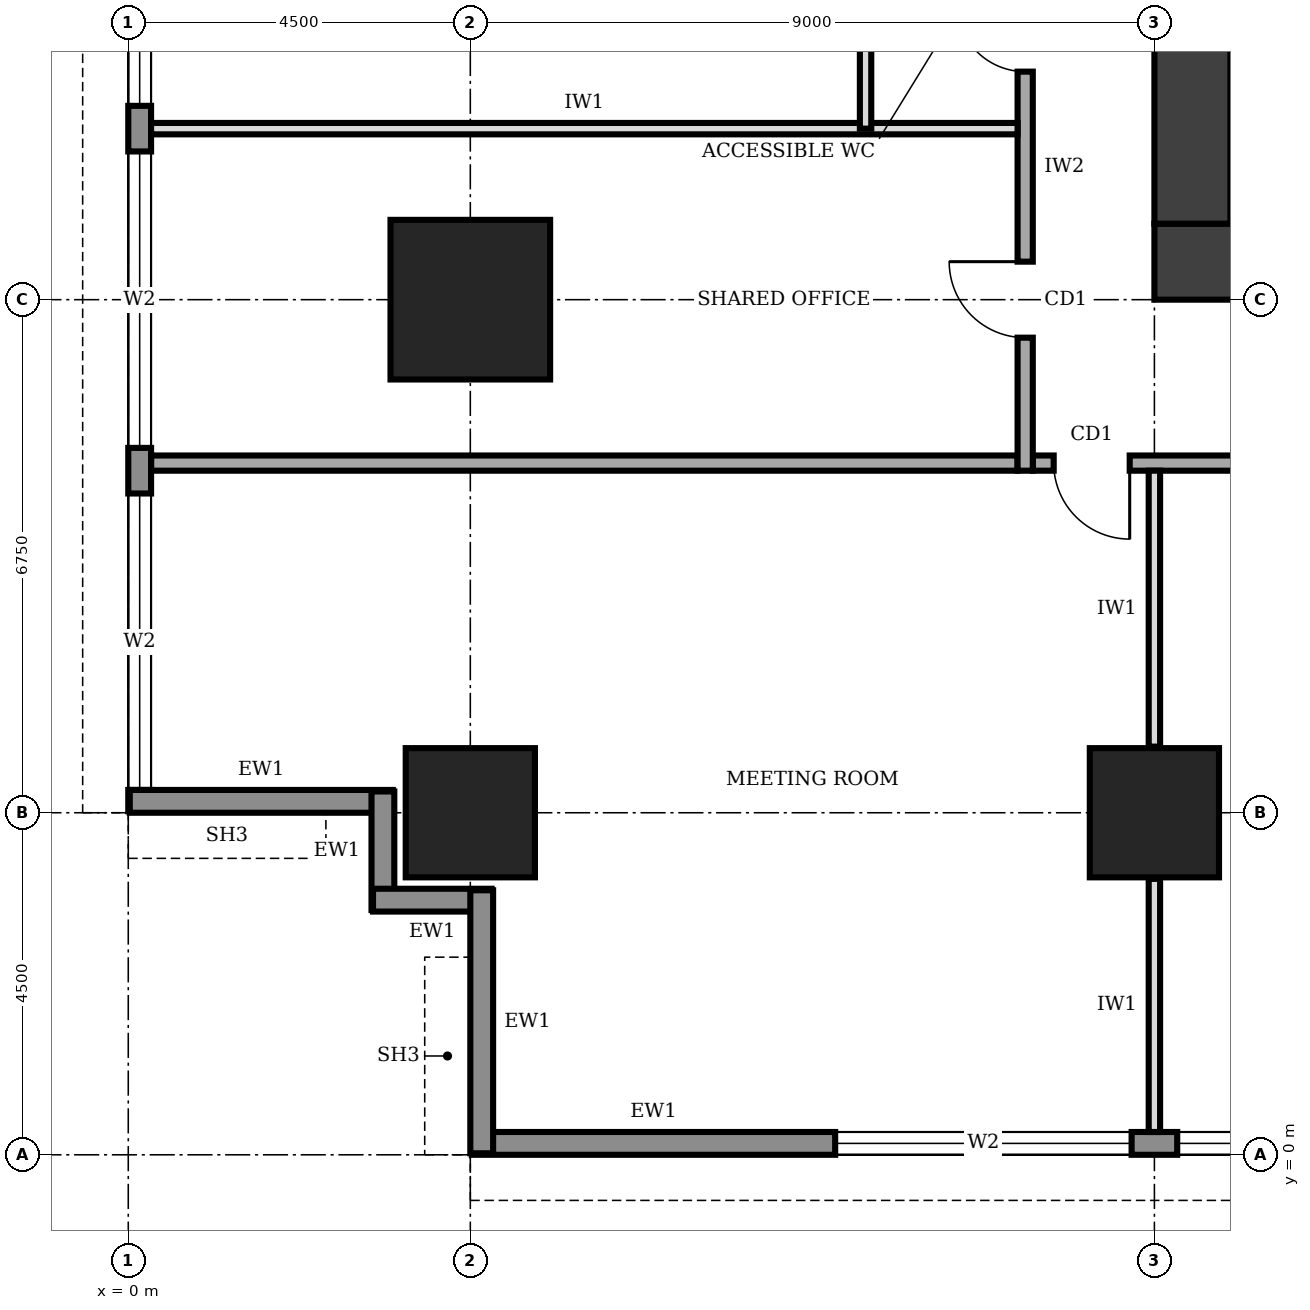
"""IFC4 building model, lengths in metres.
Left out: names, types, materials, properties, quantities, classifications, styles, units other than length and angle.
Written with IfcOpenShell. Run it as: python <this file> out.ifc"""

import sys

from ifc_helpers import new_model, si_unit, direction, frame, frame_2d, origin, origin_2d, place, context, subcontext, project, spatial, rectangle, extrude, element, fill, save


model = new_model("IFC4")
c1 = context("Model", 3, precision=1e-05, world=origin(), true_north=direction((0.0, 1.0)))
c2 = subcontext(c1, "Body", "Model", "MODEL_VIEW")
j1 = project(units=[si_unit("LENGTHUNIT", "METRE"), si_unit("PLANEANGLEUNIT", "RADIAN")], contexts=[c1])
p1 = place(None, origin())
s1 = spatial("IfcSite", under=j1, at=p1, CompositionType="ELEMENT")
p2 = place(p1, origin())
s2 = spatial("IfcBuilding", under=s1, at=p2, CompositionType="ELEMENT")
p3 = place(p2, frame((0.0, 0.0, 141.0)))
s3 = spatial("IfcBuildingStorey", under=s2, at=p3, CompositionType="ELEMENT", Elevation=141.0)
p4 = place(p3, frame((13.5, 11.75, 0.0), z_axis=(0.0, 0.0, 1.0), x_axis=(1.0, 0.0, 0.0)))
e1 = element("IfcWall", 1, at=p4, inside=s3, PredefinedType="SHEAR", context=c2, shape_type="SweptSolid", body=[
    extrude(rectangle(XDim=13.5, YDim=1.0, at=frame_2d((6.75, 0.0))), origin(), (0.0, 0.0, 1.0), 4.0),
])
p5 = place(p4, frame((4.75, 0.0, 0.0)))
e2 = element("IfcOpeningElement", 2, at=p5, cuts=e1, PredefinedType="OPENING", context=c2, shape_type="SweptSolid", body=[
    extrude(rectangle(XDim=1.0, YDim=2.1, at=frame_2d((0.5, 1.05))), frame((0.0, 0.51, 0.0), z_axis=(0.0, -1.0, 0.0), x_axis=(1.0, 0.0, 0.0)), (0.0, 0.0, 1.0), 1.02),
])
p6 = place(p3, frame((14.0, 28.25, 0.0), z_axis=(0.0, 0.0, 1.0), x_axis=(0.0, -1.0, 0.0)))
e3 = element("IfcWall", 3, at=p6, inside=s3, PredefinedType="SHEAR", context=c2, shape_type="SweptSolid", body=[
    extrude(rectangle(XDim=16.0, YDim=1.0, at=frame_2d((8.0, 0.0))), origin(), (0.0, 0.0, 1.0), 4.0),
])
for number, where, z_axis, x_axis in (
    (4, (4.5, 4.5, 0.0), (0.0, 0.0, 1.0), (1.0, 0.0, 0.0)),
    (5, (13.5, 4.5, 0.0), (0.0, 0.0, 1.0), (1.0, 0.0, 0.0)),
):
    element("IfcColumn", number, at=place(p3, frame(where, z_axis=z_axis, x_axis=x_axis)), inside=s3, PredefinedType="COLUMN", context=c2, shape_type="SweptSolid", body=[
        extrude(rectangle(XDim=1.7, YDim=1.7, at=origin_2d()), origin(), (0.0, 0.0, 1.0), 4.0),
    ])
p7 = place(p3, frame((4.5, 11.25, 0.0), z_axis=(0.0, 0.0, 1.0), x_axis=(1.0, 0.0, 0.0)))
e6 = element("IfcColumn", 6, at=p7, inside=s3, PredefinedType="COLUMN", context=c2, shape_type="SweptSolid", body=[
    extrude(rectangle(XDim=2.1, YDim=2.1, at=origin_2d()), origin(), (0.0, 0.0, 1.0), 4.0),
])
p8 = place(p3, frame((4.52, 0.15, 0.0), z_axis=(0.0, 0.0, 1.0), x_axis=(1.0, 0.0, 0.0)))
e7 = element("IfcWall", 7, at=p8, inside=s3, PredefinedType="STANDARD", context=c2, shape_type="SweptSolid", body=[
    extrude(rectangle(XDim=31.46, YDim=0.3, at=frame_2d((15.73, 0.0))), origin(), (0.0, 0.0, 1.0), 3.75),
])
p9 = place(p8, frame((4.78, 0.0, 0.6)))
e8 = element("IfcOpeningElement", 8, at=p9, cuts=e7, PredefinedType="OPENING", context=c2, shape_type="SweptSolid", body=[
    extrude(rectangle(XDim=3.9, YDim=2.6, at=frame_2d((1.95, 1.3))), frame((0.0, 0.16, 0.0), z_axis=(0.0, -1.0, 0.0), x_axis=(1.0, 0.0, 0.0)), (0.0, 0.0, 1.0), 0.32),
])
p10 = place(p8, frame((9.28, 0.0, 0.6)))
e9 = element("IfcOpeningElement", 9, at=p10, cuts=e7, PredefinedType="OPENING", context=c2, shape_type="SweptSolid", body=[
    extrude(rectangle(XDim=3.9, YDim=2.6, at=frame_2d((1.95, 1.3))), frame((0.0, 0.16, 0.0), z_axis=(0.0, -1.0, 0.0), x_axis=(1.0, 0.0, 0.0)), (0.0, 0.0, 1.0), 0.32),
])
p11 = place(p8, frame((13.78, 0.0, 0.6)))
e10 = element("IfcOpeningElement", 10, at=p11, cuts=e7, PredefinedType="OPENING", context=c2, shape_type="SweptSolid", body=[
    extrude(rectangle(XDim=3.9, YDim=2.6, at=frame_2d((1.95, 1.3))), frame((0.0, 0.16, 0.0), z_axis=(0.0, -1.0, 0.0), x_axis=(1.0, 0.0, 0.0)), (0.0, 0.0, 1.0), 0.32),
])
p12 = place(p8, frame((18.28, 0.0, 0.6)))
e11 = element("IfcOpeningElement", 11, at=p12, cuts=e7, PredefinedType="OPENING", context=c2, shape_type="SweptSolid", body=[
    extrude(rectangle(XDim=3.9, YDim=2.6, at=frame_2d((1.95, 1.3))), frame((0.0, 0.16, 0.0), z_axis=(0.0, -1.0, 0.0), x_axis=(1.0, 0.0, 0.0)), (0.0, 0.0, 1.0), 0.32),
])
p13 = place(p8, frame((22.78, 0.0, 0.6)))
e12 = element("IfcOpeningElement", 12, at=p13, cuts=e7, PredefinedType="OPENING", context=c2, shape_type="SweptSolid", body=[
    extrude(rectangle(XDim=3.9, YDim=2.6, at=frame_2d((1.95, 1.3))), frame((0.0, 0.16, 0.0), z_axis=(0.0, -1.0, 0.0), x_axis=(1.0, 0.0, 0.0)), (0.0, 0.0, 1.0), 0.32),
])
p14 = place(p8, frame((27.28, 0.0, 0.6)))
e13 = element("IfcOpeningElement", 13, at=p14, cuts=e7, PredefinedType="OPENING", context=c2, shape_type="SweptSolid", body=[
    extrude(rectangle(XDim=3.9, YDim=2.6, at=frame_2d((1.95, 1.3))), frame((0.0, 0.16, 0.0), z_axis=(0.0, -1.0, 0.0), x_axis=(1.0, 0.0, 0.0)), (0.0, 0.0, 1.0), 0.32),
])
p15 = place(p3, frame((0.15, 35.98, 0.0), z_axis=(0.0, 0.0, 1.0), x_axis=(0.0, -1.0, 0.0)))
e14 = element("IfcWall", 14, at=p15, inside=s3, PredefinedType="STANDARD", context=c2, shape_type="SweptSolid", body=[
    extrude(rectangle(XDim=31.46, YDim=0.3, at=frame_2d((15.73, 0.0))), origin(), (0.0, 0.0, 1.0), 3.75),
])
p16 = place(p15, frame((27.28, 0.0, 0.6)))
e15 = element("IfcOpeningElement", 15, at=p16, cuts=e14, PredefinedType="OPENING", context=c2, shape_type="SweptSolid", body=[
    extrude(rectangle(XDim=3.9, YDim=2.6, at=frame_2d((1.95, 1.3))), frame((0.0, 0.16, 0.0), z_axis=(0.0, -1.0, 0.0), x_axis=(1.0, 0.0, 0.0)), (0.0, 0.0, 1.0), 0.32),
])
p17 = place(p15, frame((22.78, 0.0, 0.6)))
e16 = element("IfcOpeningElement", 16, at=p17, cuts=e14, PredefinedType="OPENING", context=c2, shape_type="SweptSolid", body=[
    extrude(rectangle(XDim=3.9, YDim=2.6, at=frame_2d((1.95, 1.3))), frame((0.0, 0.16, 0.0), z_axis=(0.0, -1.0, 0.0), x_axis=(1.0, 0.0, 0.0)), (0.0, 0.0, 1.0), 0.32),
])
p18 = place(p15, frame((18.28, 0.0, 0.6)))
e17 = element("IfcOpeningElement", 17, at=p18, cuts=e14, PredefinedType="OPENING", context=c2, shape_type="SweptSolid", body=[
    extrude(rectangle(XDim=3.9, YDim=2.6, at=frame_2d((1.95, 1.3))), frame((0.0, 0.16, 0.0), z_axis=(0.0, -1.0, 0.0), x_axis=(1.0, 0.0, 0.0)), (0.0, 0.0, 1.0), 0.32),
])
p19 = place(p15, frame((13.78, 0.0, 0.6)))
e18 = element("IfcOpeningElement", 18, at=p19, cuts=e14, PredefinedType="OPENING", context=c2, shape_type="SweptSolid", body=[
    extrude(rectangle(XDim=3.9, YDim=2.6, at=frame_2d((1.95, 1.3))), frame((0.0, 0.16, 0.0), z_axis=(0.0, -1.0, 0.0), x_axis=(1.0, 0.0, 0.0)), (0.0, 0.0, 1.0), 0.32),
])
p20 = place(p15, frame((9.28, 0.0, 0.6)))
e19 = element("IfcOpeningElement", 19, at=p20, cuts=e14, PredefinedType="OPENING", context=c2, shape_type="SweptSolid", body=[
    extrude(rectangle(XDim=3.9, YDim=2.6, at=frame_2d((1.95, 1.3))), frame((0.0, 0.16, 0.0), z_axis=(0.0, -1.0, 0.0), x_axis=(1.0, 0.0, 0.0)), (0.0, 0.0, 1.0), 0.32),
])
p21 = place(p15, frame((4.78, 0.0, 0.6)))
e20 = element("IfcOpeningElement", 20, at=p21, cuts=e14, PredefinedType="OPENING", context=c2, shape_type="SweptSolid", body=[
    extrude(rectangle(XDim=3.9, YDim=2.6, at=frame_2d((1.95, 1.3))), frame((0.0, 0.16, 0.0), z_axis=(0.0, -1.0, 0.0), x_axis=(1.0, 0.0, 0.0)), (0.0, 0.0, 1.0), 0.32),
])
p22 = place(p3, frame((0.02, 4.65, 0.0), z_axis=(0.0, 0.0, 1.0), x_axis=(1.0, 0.0, 0.0)))
e21 = element("IfcWall", 21, at=p22, inside=s3, PredefinedType="STANDARD", context=c2, shape_type="SweptSolid", body=[
    extrude(rectangle(XDim=3.46, YDim=0.3, at=frame_2d((1.73, 0.0))), origin(), (0.0, 0.0, 1.0), 2.85),
])
for number, where, z_axis, x_axis in (
    (22, (3.35, 4.78, 0.0), (0.0, 0.0, 1.0), (0.0, -1.0, 0.0)),
    (23, (3.22, 3.35, 0.0), (0.0, 0.0, 1.0), (1.0, 0.0, 0.0)),
):
    element("IfcWall", number, at=place(p3, frame(where, z_axis=z_axis, x_axis=x_axis)), inside=s3, PredefinedType="STANDARD", context=c2, shape_type="SweptSolid", body=[
        extrude(rectangle(XDim=1.56, YDim=0.3, at=frame_2d((0.78, 0.0))), origin(), (0.0, 0.0, 1.0), 3.75),
    ])
p23 = place(p3, frame((4.65, 3.48, 0.0), z_axis=(0.0, 0.0, 1.0), x_axis=(0.0, -1.0, 0.0)))
e24 = element("IfcWall", 24, at=p23, inside=s3, PredefinedType="STANDARD", context=c2, shape_type="SweptSolid", body=[
    extrude(rectangle(XDim=3.46, YDim=0.3, at=frame_2d((1.73, 0.0))), origin(), (0.0, 0.0, 1.0), 2.85),
])
p24 = place(p3, frame((11.9, 9.1, 0.0), z_axis=(0.0, 0.0, 1.0), x_axis=(1.0, 0.0, 0.0)))
e25 = element("IfcWall", 25, at=p24, inside=s3, PredefinedType="SOLIDWALL", context=c2, shape_type="SweptSolid", body=[
    extrude(rectangle(XDim=28.3, YDim=0.2, at=frame_2d((14.15, 0.0))), origin(), (0.0, 0.0, 1.0), 3.75),
])
p25 = place(p24, frame((0.275, 0.0, 0.0)))
e26 = element("IfcOpeningElement", 26, at=p25, cuts=e25, PredefinedType="OPENING", context=c2, shape_type="SweptSolid", body=[
    extrude(rectangle(XDim=1.0, YDim=2.1, at=frame_2d((0.5, 1.05))), frame((0.0, 0.11, 0.0), z_axis=(0.0, -1.0, 0.0), x_axis=(1.0, 0.0, 0.0)), (0.0, 0.0, 1.0), 0.22),
])
p26 = place(p24, frame((5.6, 0.0, 0.0)))
e27 = element("IfcOpeningElement", 27, at=p26, cuts=e25, PredefinedType="OPENING", context=c2, shape_type="SweptSolid", body=[
    extrude(rectangle(XDim=1.0, YDim=2.1, at=frame_2d((0.5, 1.05))), frame((0.0, 0.11, 0.0), z_axis=(0.0, -1.0, 0.0), x_axis=(1.0, 0.0, 0.0)), (0.0, 0.0, 1.0), 0.22),
])
p27 = place(p24, frame((12.35, 0.0, 0.0)))
e28 = element("IfcOpeningElement", 28, at=p27, cuts=e25, PredefinedType="OPENING", context=c2, shape_type="SweptSolid", body=[
    extrude(rectangle(XDim=1.0, YDim=2.1, at=frame_2d((0.5, 1.05))), frame((0.0, 0.11, 0.0), z_axis=(0.0, -1.0, 0.0), x_axis=(1.0, 0.0, 0.0)), (0.0, 0.0, 1.0), 0.22),
])
p28 = place(p24, frame((20.9, 0.0, 0.0)))
e29 = element("IfcOpeningElement", 29, at=p28, cuts=e25, PredefinedType="OPENING", context=c2, shape_type="SweptSolid", body=[
    extrude(rectangle(XDim=1.8, YDim=2.1, at=frame_2d((0.9, 1.05))), frame((0.0, 0.11, 0.0), z_axis=(0.0, -1.0, 0.0), x_axis=(1.0, 0.0, 0.0)), (0.0, 0.0, 1.0), 0.22),
])
p29 = place(p3, frame((11.8, 31.3, 0.0), z_axis=(0.0, 0.0, 1.0), x_axis=(0.0, -1.0, 0.0)))
e30 = element("IfcWall", 30, at=p29, inside=s3, PredefinedType="SOLIDWALL", context=c2, shape_type="SweptSolid", body=[
    extrude(rectangle(XDim=22.3, YDim=0.2, at=frame_2d((11.15, 0.0))), origin(), (0.0, 0.0, 1.0), 3.75),
])
p30 = place(p29, frame((19.55, 0.0, 0.0)))
e31 = element("IfcOpeningElement", 31, at=p30, cuts=e30, PredefinedType="OPENING", context=c2, shape_type="SweptSolid", body=[
    extrude(rectangle(XDim=1.0, YDim=2.1, at=frame_2d((0.5, 1.05))), frame((0.0, 0.11, 0.0), z_axis=(0.0, -1.0, 0.0), x_axis=(1.0, 0.0, 0.0)), (0.0, 0.0, 1.0), 0.22),
])
p31 = place(p29, frame((16.15, 0.0, 0.0)))
e32 = element("IfcOpeningElement", 32, at=p31, cuts=e30, PredefinedType="OPENING", context=c2, shape_type="SweptSolid", body=[
    extrude(rectangle(XDim=0.9, YDim=2.1, at=frame_2d((0.45, 1.05))), frame((0.0, 0.11, 0.0), z_axis=(0.0, -1.0, 0.0), x_axis=(1.0, 0.0, 0.0)), (0.0, 0.0, 1.0), 0.22),
])
p32 = place(p29, frame((12.95, 0.0, 0.0)))
e33 = element("IfcOpeningElement", 33, at=p32, cuts=e30, PredefinedType="OPENING", context=c2, shape_type="SweptSolid", body=[
    extrude(rectangle(XDim=0.9, YDim=2.1, at=frame_2d((0.45, 1.05))), frame((0.0, 0.11, 0.0), z_axis=(0.0, -1.0, 0.0), x_axis=(1.0, 0.0, 0.0)), (0.0, 0.0, 1.0), 0.22),
])
p33 = place(p29, frame((7.4, 0.0, 0.0)))
e34 = element("IfcOpeningElement", 34, at=p33, cuts=e30, PredefinedType="OPENING", context=c2, shape_type="SweptSolid", body=[
    extrude(rectangle(XDim=0.9, YDim=2.1, at=frame_2d((0.45, 1.05))), frame((0.0, 0.11, 0.0), z_axis=(0.0, -1.0, 0.0), x_axis=(1.0, 0.0, 0.0)), (0.0, 0.0, 1.0), 0.22),
])
p34 = place(p29, frame((4.8, 0.0, 0.0)))
e35 = element("IfcOpeningElement", 35, at=p34, cuts=e30, PredefinedType="OPENING", context=c2, shape_type="SweptSolid", body=[
    extrude(rectangle(XDim=1.0, YDim=2.1, at=frame_2d((0.5, 1.05))), frame((0.0, 0.11, 0.0), z_axis=(0.0, -1.0, 0.0), x_axis=(1.0, 0.0, 0.0)), (0.0, 0.0, 1.0), 0.22),
])
p35 = place(p29, frame((9.9, 0.0, 0.0)))
e36 = element("IfcOpeningElement", 36, at=p35, cuts=e30, PredefinedType="OPENING", context=c2, shape_type="SweptSolid", body=[
    extrude(rectangle(XDim=1.0, YDim=2.1, at=frame_2d((0.5, 1.05))), frame((0.0, 0.11, 0.0), z_axis=(0.0, -1.0, 0.0), x_axis=(1.0, 0.0, 0.0)), (0.0, 0.0, 1.0), 0.22),
])
p36 = place(p29, frame((1.55, 0.0, 0.0)))
e37 = element("IfcOpeningElement", 37, at=p36, cuts=e30, PredefinedType="OPENING", context=c2, shape_type="SweptSolid", body=[
    extrude(rectangle(XDim=1.0, YDim=2.1, at=frame_2d((0.5, 1.05))), frame((0.0, 0.11, 0.0), z_axis=(0.0, -1.0, 0.0), x_axis=(1.0, 0.0, 0.0)), (0.0, 0.0, 1.0), 0.22),
])
p37 = place(p3, frame((0.3, 9.1, 0.0), z_axis=(0.0, 0.0, 1.0), x_axis=(1.0, 0.0, 0.0)))
e38 = element("IfcWall", 38, at=p37, inside=s3, PredefinedType="SOLIDWALL", context=c2, shape_type="SweptSolid", body=[
    extrude(rectangle(XDim=11.4, YDim=0.2, at=frame_2d((5.7, 0.0))), origin(), (0.0, 0.0, 1.0), 3.75),
])
p38 = place(p3, frame((13.5, 0.3, 0.0), z_axis=(0.0, 0.0, 1.0), x_axis=(0.0, 1.0, 0.0)))
e39 = element("IfcWall", 39, at=p38, inside=s3, PredefinedType="PARTITIONING", context=c2, shape_type="SweptSolid", body=[
    extrude(rectangle(XDim=3.33, YDim=0.15, at=frame_2d((1.665, 0.0))), origin(), (0.0, 0.0, 1.0), 2.85),
])
p39 = place(p3, frame((13.5, 5.37, 0.0), z_axis=(0.0, 0.0, 1.0), x_axis=(0.0, 1.0, 0.0)))
e40 = element("IfcWall", 40, at=p39, inside=s3, PredefinedType="PARTITIONING", context=c2, shape_type="SweptSolid", body=[
    extrude(rectangle(XDim=3.63, YDim=0.15, at=frame_2d((1.815, 0.0))), origin(), (0.0, 0.0, 1.0), 2.85),
])
p40 = place(p3, frame((0.3, 13.5, 0.0), z_axis=(0.0, 0.0, 1.0), x_axis=(1.0, 0.0, 0.0)))
e41 = element("IfcWall", 41, at=p40, inside=s3, PredefinedType="PARTITIONING", context=c2, shape_type="SweptSolid", body=[
    extrude(rectangle(XDim=11.4, YDim=0.15, at=frame_2d((5.7, 0.0))), origin(), (0.0, 0.0, 1.0), 3.75),
])
p41 = place(p3, frame((9.7, 13.5, 0.0), z_axis=(0.0, 0.0, 1.0), x_axis=(0.0, 1.0, 0.0)))
e42 = element("IfcWall", 42, at=p41, inside=s3, PredefinedType="PARTITIONING", context=c2, shape_type="SweptSolid", body=[
    extrude(rectangle(XDim=2.4, YDim=0.15, at=frame_2d((1.2, 0.0))), origin(), (0.0, 0.0, 1.0), 3.75),
])
p42 = place(p9, origin())
e43 = element("IfcWindow", 43, at=p42, inside=s3, PartitioningType="SINGLE_PANEL", PredefinedType="WINDOW", context=c2, shape_type="SweptSolid", body=[
    extrude(rectangle(XDim=3.9, YDim=2.6, at=frame_2d((1.95, 1.3))), frame((0.0, 0.03, 0.0), z_axis=(0.0, -1.0, 0.0), x_axis=(1.0, 0.0, 0.0)), (0.0, 0.0, 1.0), 0.06),
])
fill(e8, e43)
p43 = place(p10, origin())
e44 = element("IfcWindow", 44, at=p43, inside=s3, PartitioningType="SINGLE_PANEL", PredefinedType="WINDOW", context=c2, shape_type="SweptSolid", body=[
    extrude(rectangle(XDim=3.9, YDim=2.6, at=frame_2d((1.95, 1.3))), frame((0.0, 0.03, 0.0), z_axis=(0.0, -1.0, 0.0), x_axis=(1.0, 0.0, 0.0)), (0.0, 0.0, 1.0), 0.06),
])
fill(e9, e44)
p44 = place(p16, origin())
e45 = element("IfcWindow", 45, at=p44, inside=s3, PartitioningType="SINGLE_PANEL", PredefinedType="WINDOW", context=c2, shape_type="SweptSolid", body=[
    extrude(rectangle(XDim=3.9, YDim=2.6, at=frame_2d((1.95, 1.3))), frame((0.0, 0.03, 0.0), z_axis=(0.0, -1.0, 0.0), x_axis=(1.0, 0.0, 0.0)), (0.0, 0.0, 1.0), 0.06),
])
fill(e15, e45)
p45 = place(p17, origin())
e46 = element("IfcWindow", 46, at=p45, inside=s3, PartitioningType="SINGLE_PANEL", PredefinedType="WINDOW", context=c2, shape_type="SweptSolid", body=[
    extrude(rectangle(XDim=3.9, YDim=2.6, at=frame_2d((1.95, 1.3))), frame((0.0, 0.03, 0.0), z_axis=(0.0, -1.0, 0.0), x_axis=(1.0, 0.0, 0.0)), (0.0, 0.0, 1.0), 0.06),
])
fill(e16, e46)
p46 = place(p18, origin())
e47 = element("IfcWindow", 47, at=p46, inside=s3, PartitioningType="SINGLE_PANEL", PredefinedType="WINDOW", context=c2, shape_type="SweptSolid", body=[
    extrude(rectangle(XDim=3.9, YDim=2.6, at=frame_2d((1.95, 1.3))), frame((0.0, 0.03, 0.0), z_axis=(0.0, -1.0, 0.0), x_axis=(1.0, 0.0, 0.0)), (0.0, 0.0, 1.0), 0.06),
])
fill(e17, e47)
p47 = place(p25, frame((1.0, 0.0, 0.0), z_axis=(0.0, 0.0, 1.0), x_axis=(-1.0, 0.0, 0.0)))
e48 = element("IfcDoor", 48, at=p47, inside=s3, OperationType="SINGLE_SWING_LEFT", PredefinedType="DOOR", context=c2, shape_type="SweptSolid", body=[
    extrude(rectangle(XDim=1.0, YDim=2.1, at=frame_2d((0.5, 1.05))), frame((0.0, 0.025, 0.0), z_axis=(0.0, -1.0, 0.0), x_axis=(1.0, 0.0, 0.0)), (0.0, 0.0, 1.0), 0.05),
])
fill(e26, e48)
p48 = place(p30, frame((1.0, 0.0, 0.0), z_axis=(0.0, 0.0, 1.0), x_axis=(-1.0, 0.0, 0.0)))
e49 = element("IfcDoor", 49, at=p48, inside=s3, OperationType="SINGLE_SWING_RIGHT", PredefinedType="DOOR", context=c2, shape_type="SweptSolid", body=[
    extrude(rectangle(XDim=1.0, YDim=2.1, at=frame_2d((0.5, 1.05))), frame((0.0, 0.025, 0.0), z_axis=(0.0, -1.0, 0.0), x_axis=(1.0, 0.0, 0.0)), (0.0, 0.0, 1.0), 0.05),
])
fill(e31, e49)
p49 = place(p31, frame((0.9, 0.0, 0.0), z_axis=(0.0, 0.0, 1.0), x_axis=(-1.0, 0.0, 0.0)))
e50 = element("IfcDoor", 50, at=p49, inside=s3, OperationType="SINGLE_SWING_RIGHT", PredefinedType="DOOR", context=c2, shape_type="SweptSolid", body=[
    extrude(rectangle(XDim=0.9, YDim=2.1, at=frame_2d((0.45, 1.05))), frame((0.0, 0.025, 0.0), z_axis=(0.0, -1.0, 0.0), x_axis=(1.0, 0.0, 0.0)), (0.0, 0.0, 1.0), 0.05),
])
fill(e32, e50)
save(model, sys.argv[1])
